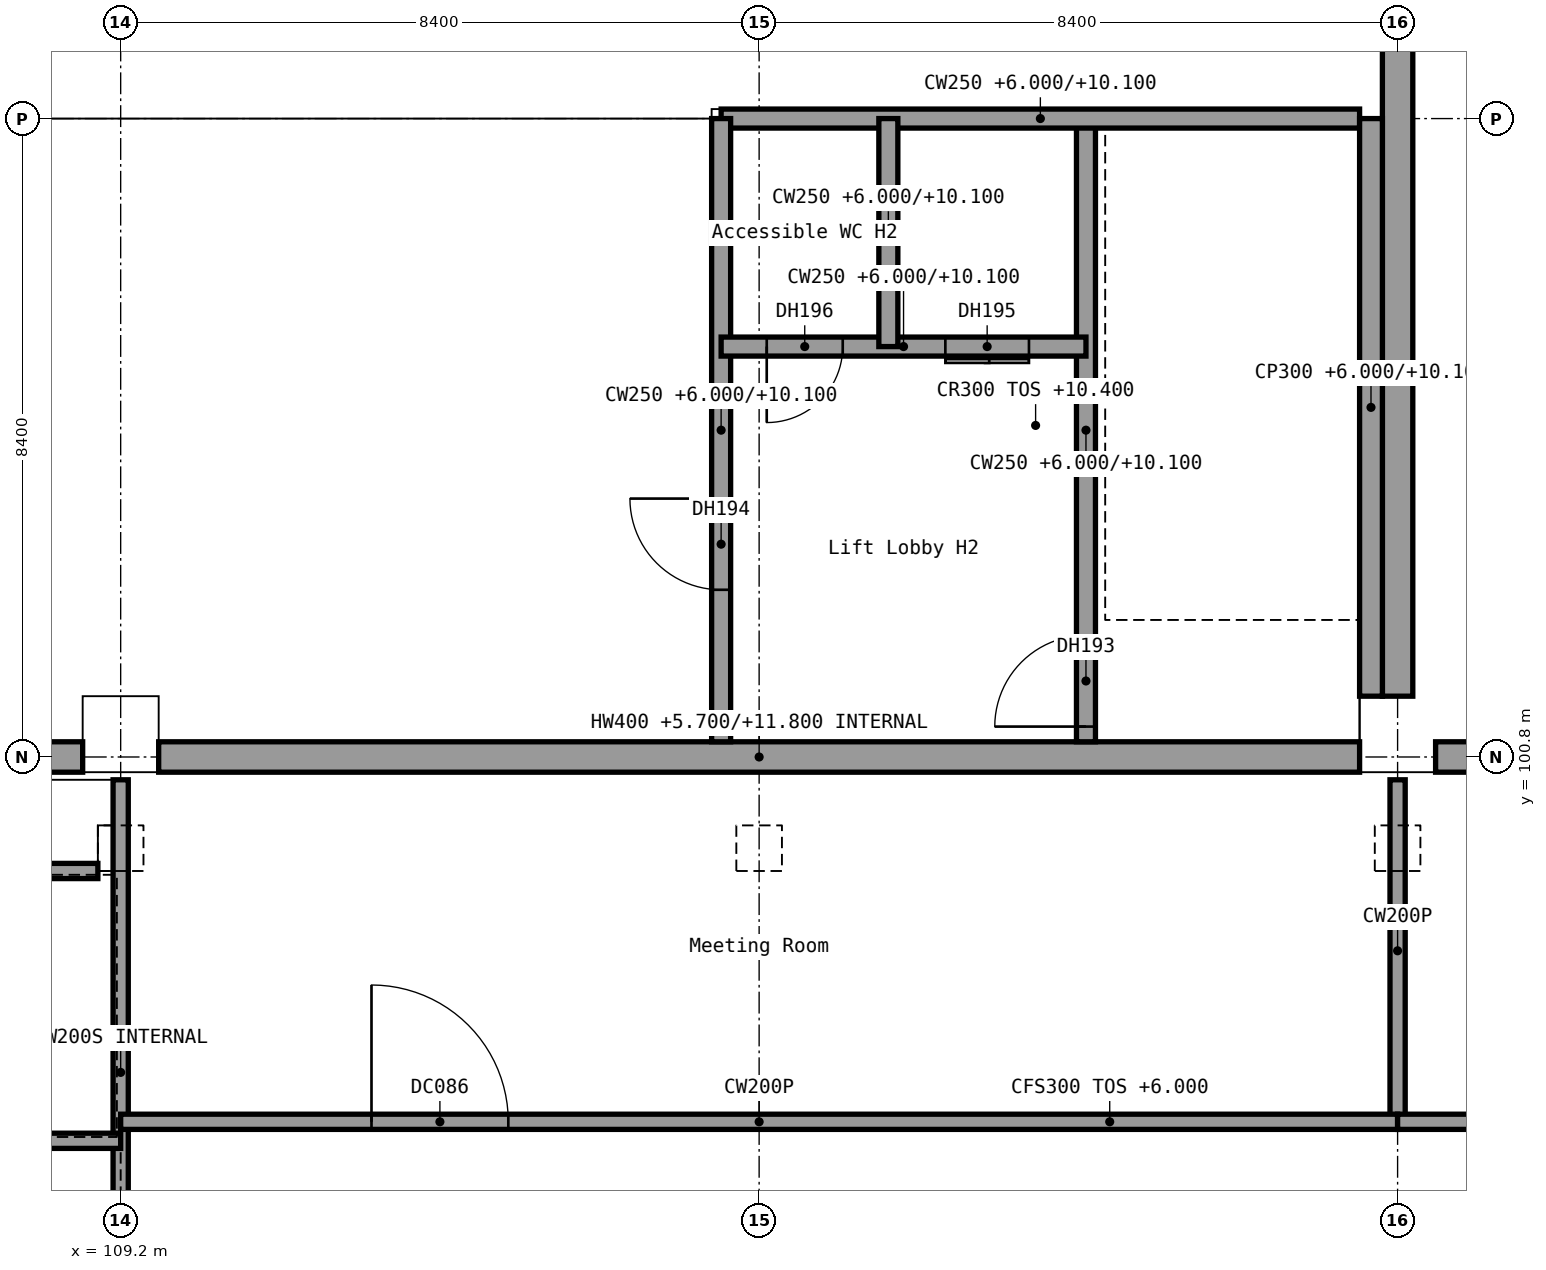
"""IFC4 building model, lengths in metres.
Left out: names, types, materials, properties, quantities, classifications, styles, units other than length and angle.
Written with IfcOpenShell. Run it as: python <this file> out.ifc"""

import sys

from ifc_helpers import new_model, si_unit, direction, frame, frame_2d, origin, origin_2d, place, context, subcontext, project, spatial, rectangle, extrude, element, fill, save


model = new_model("IFC4")
c1 = context("Model", 3, precision=1e-05, world=origin(), true_north=direction((0.0, 1.0)))
c2 = subcontext(c1, "Body", "Model", "MODEL_VIEW")
j1 = project(units=[si_unit("LENGTHUNIT", "METRE"), si_unit("PLANEANGLEUNIT", "RADIAN")], contexts=[c1])
p1 = place(None, origin())
s1 = spatial("IfcSite", under=j1, at=p1, CompositionType="ELEMENT")
p2 = place(p1, origin())
s2 = spatial("IfcBuilding", under=s1, at=p2, CompositionType="ELEMENT")
p3 = place(p2, frame((0.0, 0.0, 6.0)))
s3 = spatial("IfcBuildingStorey", under=s2, at=p3, CompositionType="ELEMENT", Elevation=6.0)
for number, where, z_axis, x_axis in (
    (1, (109.2, 100.8, 0.0), (0.0, 0.0, 1.0), (1.0, 0.0, 0.0)),
    (2, (126.0, 100.8, 0.0), (0.0, 0.0, 1.0), (1.0, 0.0, 0.0)),
):
    element("IfcColumn", number, at=place(p3, frame(where, z_axis=z_axis, x_axis=x_axis)), inside=s3, PredefinedType="COLUMN", context=c2, shape_type="SweptSolid", body=[
        extrude(rectangle(XDim=1.0, YDim=1.6, at=origin_2d()), origin(), (0.0, 0.0, 1.0), 4.5),
    ])
for number, where, z_axis, x_axis in (
    (3, (92.9, 100.8, -0.3), (0.0, 0.0, 1.0), (1.0, 0.0, 0.0)),
    (4, (109.7, 100.8, -0.3), (0.0, 0.0, 1.0), (1.0, 0.0, 0.0)),
):
    element("IfcWall", number, at=place(p3, frame(where, z_axis=z_axis, x_axis=x_axis)), inside=s3, PredefinedType="STANDARD", context=c2, shape_type="SweptSolid", body=[
        extrude(rectangle(XDim=15.8, YDim=0.4, at=frame_2d((7.9, 0.0))), origin(), (0.0, 0.0, 1.0), 6.1),
    ])
p4 = place(p3, frame((126.0, 101.6, 0.0), z_axis=(0.0, 0.0, 1.0), x_axis=(0.0, 1.0, 0.0)))
e5 = element("IfcWall", 5, at=p4, inside=s3, PredefinedType="SHEAR", context=c2, shape_type="SweptSolid", body=[
    extrude(rectangle(XDim=99.2, YDim=0.4, at=frame_2d((49.6, 0.0))), origin(), (0.0, 0.0, 1.0), 5.0),
])
p5 = place(p3, frame((126.5, 100.8, -0.3), z_axis=(0.0, 0.0, 1.0), x_axis=(1.0, 0.0, 0.0)))
e6 = element("IfcWall", 6, at=p5, inside=s3, PredefinedType="SHEAR", context=c2, shape_type="SweptSolid", body=[
    extrude(rectangle(XDim=15.8, YDim=0.4, at=frame_2d((7.9, 0.0))), origin(), (0.0, 0.0, 1.0), 4.9),
])
p6 = place(p5, frame((6.35, 0.0, 0.3)))
e7 = element("IfcOpeningElement", 7, at=p6, cuts=e6, PredefinedType="OPENING", context=c2, shape_type="SweptSolid", body=[
    extrude(rectangle(XDim=1.2, YDim=2.1, at=frame_2d((0.6, 1.05))), frame((0.0, 0.2, 0.0), z_axis=(0.0, -1.0, 0.0), x_axis=(1.0, 0.0, 0.0)), (0.0, 0.0, 1.0), 0.4),
])
p7 = place(p3, frame((121.9, 101.0, 0.0), z_axis=(0.0, 0.0, 1.0), x_axis=(0.0, 1.0, 0.0)))
e8 = element("IfcWall", 8, at=p7, inside=s3, PredefinedType="SHEAR", context=c2, shape_type="SweptSolid", body=[
    extrude(rectangle(XDim=8.2, YDim=0.25, at=frame_2d((4.1, 0.0))), origin(), (0.0, 0.0, 1.0), 4.1),
])
p8 = place(p7, frame((0.2, 0.0, 0.0)))
e9 = element("IfcOpeningElement", 9, at=p8, cuts=e8, PredefinedType="OPENING", context=c2, shape_type="SweptSolid", body=[
    extrude(rectangle(XDim=1.2, YDim=2.1, at=frame_2d((0.6, 1.05))), frame((0.0, 0.125, 0.0), z_axis=(0.0, -1.0, 0.0), x_axis=(1.0, 0.0, 0.0)), (0.0, 0.0, 1.0), 0.25),
])
p9 = place(p3, frame((125.5, 109.2, 0.0), z_axis=(0.0, 0.0, 1.0), x_axis=(-1.0, 0.0, 0.0)))
e10 = element("IfcWall", 10, at=p9, inside=s3, PredefinedType="SHEAR", context=c2, shape_type="SweptSolid", body=[
    extrude(rectangle(XDim=8.4, YDim=0.25, at=frame_2d((4.2, 0.0))), origin(), (0.0, 0.0, 1.0), 4.1),
])
p10 = place(p3, frame((117.1, 101.0, 0.0), z_axis=(0.0, 0.0, 1.0), x_axis=(0.0, 1.0, 0.0)))
e11 = element("IfcWall", 11, at=p10, inside=s3, PredefinedType="SHEAR", context=c2, shape_type="SweptSolid", body=[
    extrude(rectangle(XDim=8.2, YDim=0.25, at=frame_2d((4.1, 0.0))), origin(), (0.0, 0.0, 1.0), 4.1),
])
p11 = place(p10, frame((2.0, 0.0, 0.0)))
e12 = element("IfcOpeningElement", 12, at=p11, cuts=e11, PredefinedType="OPENING", context=c2, shape_type="SweptSolid", body=[
    extrude(rectangle(XDim=1.2, YDim=2.1, at=frame_2d((0.6, 1.05))), frame((0.0, 0.125, 0.0), z_axis=(0.0, -1.0, 0.0), x_axis=(1.0, 0.0, 0.0)), (0.0, 0.0, 1.0), 0.25),
])
p12 = place(p3, frame((121.9, 106.2, 0.0), z_axis=(0.0, 0.0, 1.0), x_axis=(-1.0, 0.0, 0.0)))
e13 = element("IfcWall", 13, at=p12, inside=s3, PredefinedType="SHEAR", context=c2, shape_type="SweptSolid", body=[
    extrude(rectangle(XDim=4.8, YDim=0.25, at=frame_2d((2.4, 0.0))), origin(), (0.0, 0.0, 1.0), 4.1),
])
p13 = place(p12, frame((0.75, 0.0, 0.0)))
e14 = element("IfcOpeningElement", 14, at=p13, cuts=e13, PredefinedType="OPENING", context=c2, shape_type="SweptSolid", body=[
    extrude(rectangle(XDim=1.1, YDim=2.1, at=frame_2d((0.55, 1.05))), frame((0.0, 0.125, 0.0), z_axis=(0.0, -1.0, 0.0), x_axis=(1.0, 0.0, 0.0)), (0.0, 0.0, 1.0), 0.25),
])
p14 = place(p12, frame((3.2, 0.0, 0.0)))
e15 = element("IfcOpeningElement", 15, at=p14, cuts=e13, PredefinedType="OPENING", context=c2, shape_type="SweptSolid", body=[
    extrude(rectangle(XDim=1.0, YDim=2.1, at=frame_2d((0.5, 1.05))), frame((0.0, 0.125, 0.0), z_axis=(0.0, -1.0, 0.0), x_axis=(1.0, 0.0, 0.0)), (0.0, 0.0, 1.0), 0.25),
])
p15 = place(p3, frame((119.3, 106.2, 0.0), z_axis=(0.0, 0.0, 1.0), x_axis=(0.0, 1.0, 0.0)))
e16 = element("IfcWall", 16, at=p15, inside=s3, PredefinedType="SHEAR", context=c2, shape_type="SweptSolid", body=[
    extrude(rectangle(XDim=3.0, YDim=0.25, at=frame_2d((1.5, 0.0))), origin(), (0.0, 0.0, 1.0), 4.1),
])
p16 = place(p3, frame((125.65, 101.6, 0.0), z_axis=(0.0, 0.0, 1.0), x_axis=(0.0, 1.0, 0.0)))
e17 = element("IfcWall", 17, at=p16, inside=s3, PredefinedType="SHEAR", context=c2, shape_type="SweptSolid", body=[
    extrude(rectangle(XDim=7.6, YDim=0.3, at=frame_2d((3.8, 0.0))), origin(), (0.0, 0.0, 1.0), 4.1),
])
for number, where, z_axis, x_axis in (
    (18, (109.2, 99.6, 0.0), (0.0, 0.0, 1.0), (1.0, 0.0, 0.0)),
    (19, (117.6, 99.6, 0.0), (0.0, 0.0, 1.0), (1.0, 0.0, 0.0)),
    (20, (126.0, 99.6, 0.0), (0.0, 0.0, 1.0), (1.0, 0.0, 0.0)),
):
    element("IfcColumn", number, at=place(p3, frame(where, z_axis=z_axis, x_axis=x_axis)), inside=s3, PredefinedType="COLUMN", context=c2, shape_type="SweptSolid", body=[
        extrude(rectangle(XDim=0.6, YDim=0.6, at=origin_2d()), origin(), (0.0, 0.0, 1.0), 4.5),
    ])
p17 = place(p3, frame((109.2, 100.5, 0.0), z_axis=(0.0, 0.0, 1.0), x_axis=(0.0, -1.0, 0.0)))
e21 = element("IfcWall", 21, at=p17, inside=s3, PredefinedType="SOLIDWALL", context=c2, shape_type="SweptSolid", body=[
    extrude(rectangle(XDim=7.7, YDim=0.2, at=frame_2d((3.85, 0.0))), origin(), (0.0, 0.0, 1.0), 4.2),
])
p18 = place(p3, frame((126.0, 100.5, 0.0), z_axis=(0.0, 0.0, 1.0), x_axis=(0.0, -1.0, 0.0)))
e22 = element("IfcWall", 22, at=p18, inside=s3, PredefinedType="PARTITIONING", context=c2, shape_type="SweptSolid", body=[
    extrude(rectangle(XDim=4.5, YDim=0.2, at=frame_2d((2.25, 0.0))), origin(), (0.0, 0.0, 1.0), 4.5),
])
p19 = place(p3, frame((109.2, 96.0, 0.0), z_axis=(0.0, 0.0, 1.0), x_axis=(1.0, 0.0, 0.0)))
e23 = element("IfcWall", 23, at=p19, inside=s3, PredefinedType="PARTITIONING", context=c2, shape_type="SweptSolid", body=[
    extrude(rectangle(XDim=16.8, YDim=0.2, at=frame_2d((8.4, 0.0))), origin(), (0.0, 0.0, 1.0), 4.5),
])
p20 = place(p19, frame((3.3, 0.0, 0.0)))
e24 = element("IfcOpeningElement", 24, at=p20, cuts=e23, PredefinedType="OPENING", context=c2, shape_type="SweptSolid", body=[
    extrude(rectangle(XDim=1.8, YDim=2.4, at=frame_2d((0.9, 1.2))), frame((0.0, 0.1, 0.0), z_axis=(0.0, -1.0, 0.0), x_axis=(1.0, 0.0, 0.0)), (0.0, 0.0, 1.0), 0.2),
])
p21 = place(p3, frame((126.0, 96.0, 0.0), z_axis=(0.0, 0.0, 1.0), x_axis=(1.0, 0.0, 0.0)))
e25 = element("IfcWall", 25, at=p21, inside=s3, PredefinedType="PARTITIONING", context=c2, shape_type="SweptSolid", body=[
    extrude(rectangle(XDim=16.8, YDim=0.2, at=frame_2d((8.4, 0.0))), origin(), (0.0, 0.0, 1.0), 4.5),
])
p22 = place(p21, frame((3.3, 0.0, 0.0)))
e26 = element("IfcOpeningElement", 26, at=p22, cuts=e25, PredefinedType="OPENING", context=c2, shape_type="SweptSolid", body=[
    extrude(rectangle(XDim=1.8, YDim=2.4, at=frame_2d((0.9, 1.2))), frame((0.0, 0.1, 0.0), z_axis=(0.0, -1.0, 0.0), x_axis=(1.0, 0.0, 0.0)), (0.0, 0.0, 1.0), 0.2),
])
p23 = place(p3, frame((101.1, 99.3, 0.0), z_axis=(0.0, 0.0, 1.0), x_axis=(1.0, 0.0, 0.0)))
e27 = element("IfcWall", 27, at=p23, inside=s3, PredefinedType="SOLIDWALL", context=c2, shape_type="SweptSolid", body=[
    extrude(rectangle(XDim=7.8, YDim=0.2, at=frame_2d((3.9, 0.0))), origin(), (0.0, 0.0, 1.0), 4.2),
])
p24 = place(p3, frame((100.8, 95.75, 0.0), z_axis=(0.0, 0.0, 1.0), x_axis=(1.0, 0.0, 0.0)))
e28 = element("IfcWall", 28, at=p24, inside=s3, PredefinedType="SOLIDWALL", context=c2, shape_type="SweptSolid", body=[
    extrude(rectangle(XDim=8.4, YDim=0.2, at=frame_2d((4.2, 0.0))), origin(), (0.0, 0.0, 1.0), 4.2),
])
p25 = place(p24, frame((0.4, 0.0, 0.0)))
e29 = element("IfcOpeningElement", 29, at=p25, cuts=e28, PredefinedType="OPENING", context=c2, shape_type="SweptSolid", body=[
    extrude(rectangle(XDim=1.2, YDim=2.4, at=frame_2d((0.6, 1.2))), frame((0.0, 0.1, 0.0), z_axis=(0.0, -1.0, 0.0), x_axis=(1.0, 0.0, 0.0)), (0.0, 0.0, 1.0), 0.2),
])
p26 = place(p8, origin())
e30 = element("IfcDoor", 30, at=p26, inside=s3, OperationType="SINGLE_SWING_LEFT", PredefinedType="DOOR", context=c2, shape_type="SweptSolid", body=[
    extrude(rectangle(XDim=1.2, YDim=2.1, at=frame_2d((0.6, 1.05))), frame((0.0, 0.025, 0.0), z_axis=(0.0, -1.0, 0.0), x_axis=(1.0, 0.0, 0.0)), (0.0, 0.0, 1.0), 0.05),
])
fill(e9, e30)
p27 = place(p11, origin())
e31 = element("IfcDoor", 31, at=p27, inside=s3, OperationType="SINGLE_SWING_LEFT", PredefinedType="DOOR", context=c2, shape_type="SweptSolid", body=[
    extrude(rectangle(XDim=1.2, YDim=2.1, at=frame_2d((0.6, 1.05))), frame((0.0, 0.025, 0.0), z_axis=(0.0, -1.0, 0.0), x_axis=(1.0, 0.0, 0.0)), (0.0, 0.0, 1.0), 0.05),
])
fill(e12, e31)
p28 = place(p13, origin())
e32 = element("IfcDoor", 32, at=p28, inside=s3, OperationType="DOUBLE_DOOR_SLIDING", PredefinedType="DOOR", context=c2, shape_type="SweptSolid", body=[
    extrude(rectangle(XDim=1.1, YDim=2.1, at=frame_2d((0.55, 1.05))), frame((0.0, 0.025, 0.0), z_axis=(0.0, -1.0, 0.0), x_axis=(1.0, 0.0, 0.0)), (0.0, 0.0, 1.0), 0.05),
])
fill(e14, e32)
p29 = place(p14, origin())
e33 = element("IfcDoor", 33, at=p29, inside=s3, OperationType="SINGLE_SWING_RIGHT", PredefinedType="DOOR", context=c2, shape_type="SweptSolid", body=[
    extrude(rectangle(XDim=1.0, YDim=2.1, at=frame_2d((0.5, 1.05))), frame((0.0, 0.025, 0.0), z_axis=(0.0, -1.0, 0.0), x_axis=(1.0, 0.0, 0.0)), (0.0, 0.0, 1.0), 0.05),
])
fill(e15, e33)
p30 = place(p20, origin())
e34 = element("IfcDoor", 34, at=p30, inside=s3, OperationType="DOUBLE_DOOR_DOUBLE_SWING", PredefinedType="DOOR", context=c2, shape_type="SweptSolid", body=[
    extrude(rectangle(XDim=1.8, YDim=2.4, at=frame_2d((0.9, 1.2))), frame((0.0, 0.025, 0.0), z_axis=(0.0, -1.0, 0.0), x_axis=(1.0, 0.0, 0.0)), (0.0, 0.0, 1.0), 0.05),
])
fill(e24, e34)
save(model, sys.argv[1])
